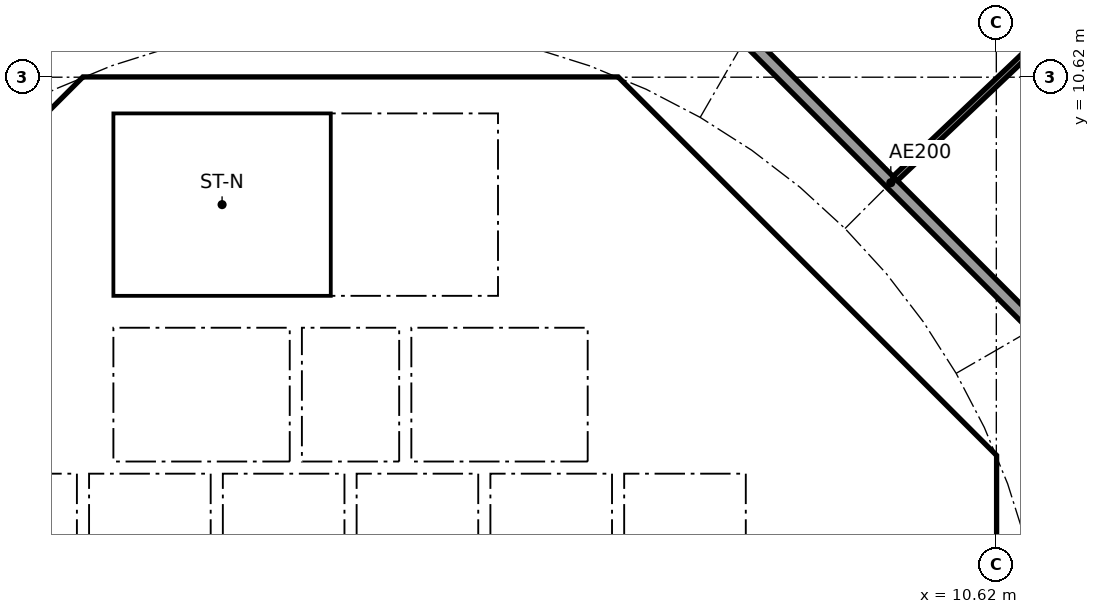
"""IFC4 building model, lengths in metres.
Left out: names, types, materials, properties, quantities, classifications, styles, units other than length and angle.
Written with IfcOpenShell. Run it as: python <this file> out.ifc"""

import sys

from ifc_helpers import new_model, si_unit, direction, frame, frame_2d, origin, place, context, subcontext, project, spatial, polyline, rectangle, outline, extrude, element, fill, save


model = new_model("IFC4")
c1 = context("Model", 3, precision=1e-05, world=origin(), true_north=direction((0.0, 1.0)))
c2 = subcontext(c1, "Body", "Model", "MODEL_VIEW")
j1 = project(units=[si_unit("LENGTHUNIT", "METRE"), si_unit("PLANEANGLEUNIT", "RADIAN")], contexts=[c1])
p1 = place(None, origin())
s1 = spatial("IfcSite", under=j1, at=p1, CompositionType="ELEMENT")
p2 = place(p1, origin())
s2 = spatial("IfcBuilding", under=s1, at=p2, CompositionType="ELEMENT")
p3 = place(p2, frame((0.0, 0.0, 38.1)))
s3 = spatial("IfcBuildingStorey", under=s2, at=p3, CompositionType="ELEMENT", Elevation=38.1)
p4 = place(p3, frame((9.988, 4.613, 0.0), z_axis=(0.0, 0.0, 1.0), x_axis=(-0.707106781187, 0.707106781187, 0.0)))
e1 = element("IfcWall", 1, at=p4, inside=s3, PredefinedType="SHEAR", context=c2, shape_type="SweptSolid", body=[
    extrude(rectangle(XDim=7.602, YDim=0.6, at=frame_2d((3.801, 0.0))), origin(), (0.0, 0.0, 1.0), 3.44),
])
p5 = place(p4, frame((3.201, 0.0, 0.0)))
e2 = element("IfcOpeningElement", 2, at=p5, cuts=e1, PredefinedType="OPENING", context=c2, shape_type="SweptSolid", body=[
    extrude(rectangle(XDim=1.2, YDim=2.1, at=frame_2d((0.6, 1.05))), frame((0.0, 0.31, 0.0), z_axis=(0.0, -1.0, 0.0), x_axis=(1.0, 0.0, 0.0)), (0.0, 0.0, 1.0), 0.62),
])
p6 = place(p3, frame((-4.613, 9.988, 0.0), z_axis=(0.0, 0.0, 1.0), x_axis=(-0.707106781187, -0.707106781187, 0.0)))
e3 = element("IfcWall", 3, at=p6, inside=s3, PredefinedType="SHEAR", context=c2, shape_type="SweptSolid", body=[
    extrude(rectangle(XDim=7.602, YDim=0.6, at=frame_2d((3.801, 0.0))), origin(), (0.0, 0.0, 1.0), 3.44),
])
p7 = place(p6, frame((0.351, 0.0, 0.0)))
e4 = element("IfcOpeningElement", 4, at=p7, cuts=e3, PredefinedType="OPENING", context=c2, shape_type="SweptSolid", body=[
    extrude(rectangle(XDim=1.1, YDim=2.1, at=frame_2d((0.55, 1.05))), frame((0.0, 0.31, 0.0), z_axis=(0.0, -1.0, 0.0), x_axis=(1.0, 0.0, 0.0)), (0.0, 0.0, 1.0), 0.62),
])
p8 = place(p3, frame((4.0, 4.3, 0.0), z_axis=(0.0, 0.0, 1.0), x_axis=(0.0, 1.0, 0.0)))
e5 = element("IfcWall", 5, at=p8, inside=s3, PredefinedType="SOLIDWALL", context=c2, shape_type="SweptSolid", body=[
    extrude(rectangle(XDim=2.2, YDim=0.2, at=frame_2d((1.1, 0.0))), origin(), (0.0, 0.0, 1.0), 3.44),
])
p9 = place(p8, frame((0.55, 0.0, 0.0)))
e6 = element("IfcOpeningElement", 6, at=p9, cuts=e5, PredefinedType="OPENING", context=c2, shape_type="SweptSolid", body=[
    extrude(rectangle(XDim=1.1, YDim=2.1, at=frame_2d((0.55, 1.05))), frame((0.0, 0.11, 0.0), z_axis=(0.0, -1.0, 0.0), x_axis=(1.0, 0.0, 0.0)), (0.0, 0.0, 1.0), 0.22),
])
p10 = place(p3, frame((-4.0, 4.3, 0.0), z_axis=(0.0, 0.0, 1.0), x_axis=(0.0, 1.0, 0.0)))
e7 = element("IfcWall", 7, at=p10, inside=s3, PredefinedType="SOLIDWALL", context=c2, shape_type="SweptSolid", body=[
    extrude(rectangle(XDim=2.2, YDim=0.2, at=frame_2d((1.1, 0.0))), origin(), (0.0, 0.0, 1.0), 3.44),
])
p11 = place(p10, frame((0.55, 0.0, 0.0)))
e8 = element("IfcOpeningElement", 8, at=p11, cuts=e7, PredefinedType="OPENING", context=c2, shape_type="SweptSolid", body=[
    extrude(rectangle(XDim=1.1, YDim=2.1, at=frame_2d((0.55, 1.05))), frame((0.0, 0.11, 0.0), z_axis=(0.0, -1.0, 0.0), x_axis=(1.0, 0.0, 0.0)), (0.0, 0.0, 1.0), 0.22),
])
p12 = place(p3, frame((6.7, 4.0, 0.0), z_axis=(0.0, 0.0, 1.0), x_axis=(1.0, 0.0, 0.0)))
e9 = element("IfcWall", 9, at=p12, inside=s3, PredefinedType="SOLIDWALL", context=c2, shape_type="SweptSolid", body=[
    extrude(rectangle(XDim=3.325, YDim=0.2, at=frame_2d((1.662, 0.0))), origin(), (0.0, 0.0, 1.0), 3.44),
])
p13 = place(p12, frame((1.25, 0.0, 0.0)))
e10 = element("IfcOpeningElement", 10, at=p13, cuts=e9, PredefinedType="OPENING", context=c2, shape_type="SweptSolid", body=[
    extrude(rectangle(XDim=1.1, YDim=2.1, at=frame_2d((0.55, 1.05))), frame((0.0, 0.11, 0.0), z_axis=(0.0, -1.0, 0.0), x_axis=(1.0, 0.0, 0.0)), (0.0, 0.0, 1.0), 0.22),
])
p14 = place(p3, frame((4.0, 7.025, 0.0), z_axis=(0.0, 0.0, 1.0), x_axis=(0.0, 1.0, 0.0)))
e11 = element("IfcWall", 11, at=p14, inside=s3, PredefinedType="SOLIDWALL", context=c2, shape_type="SweptSolid", body=[
    extrude(rectangle(XDim=3.0, YDim=0.2, at=frame_2d((1.5, 0.0))), origin(), (0.0, 0.0, 1.0), 3.44),
])
p15 = place(p14, frame((0.925, 0.0, 0.0)))
e12 = element("IfcOpeningElement", 12, at=p15, cuts=e11, PredefinedType="OPENING", context=c2, shape_type="SweptSolid", body=[
    extrude(rectangle(XDim=1.1, YDim=2.1, at=frame_2d((0.55, 1.05))), frame((0.0, 0.11, 0.0), z_axis=(0.0, -1.0, 0.0), x_axis=(1.0, 0.0, 0.0)), (0.0, 0.0, 1.0), 0.22),
])
p16 = place(p3, origin())
e13 = element("IfcWall", 13, at=p16, inside=s3, PredefinedType="SHEAR", context=c2, shape_type="SweptSolid", body=[
    extrude(outline(polyline([(-4.152, 10.025), (-4.401, 9.776), (-4.825, 10.2), (-4.401, 10.625), (4.401, 10.625), (4.825, 10.2), (4.401, 9.776), (4.152, 10.025), (-4.152, 10.025)])), origin(), (0.0, 0.0, 1.0), 3.44),
])
p17 = place(p3, origin())
e14 = element("IfcWall", 14, at=p17, inside=s3, PredefinedType="SHEAR", context=c2, shape_type="SweptSolid", body=[
    extrude(outline(polyline([(9.776, -4.401), (10.025, -4.152), (10.025, -3.801), (10.025, 4.152), (9.776, 4.401), (10.2, 4.825), (10.625, 4.401), (10.625, -4.401), (10.2, -4.825), (9.776, -4.401)])), origin(), (0.0, 0.0, 1.0), 3.44),
])
for number, where, z_axis, x_axis in (
    (15, (-0.9, 4.3, 0.0), (0.0, 0.0, 1.0), (0.0, 1.0, 0.0)),
    (16, (0.9, 4.3, 0.0), (0.0, 0.0, 1.0), (0.0, 1.0, 0.0)),
):
    element("IfcWall", number, at=place(p3, frame(where, z_axis=z_axis, x_axis=x_axis)), inside=s3, PredefinedType="SOLIDWALL", context=c2, shape_type="SweptSolid", body=[
        extrude(rectangle(XDim=2.2, YDim=0.2, at=frame_2d((1.1, 0.0))), origin(), (0.0, 0.0, 1.0), 3.44),
    ])
p18 = place(p3, origin())
e17 = element("IfcWall", 17, at=p18, inside=s3, PredefinedType="SOLIDWALL", context=c2, shape_type="SweptSolid", body=[
    extrude(outline(polyline([(-6.5, 2.1), (-6.7, 2.1), (-6.7, 4.3), (6.7, 4.3), (6.7, 2.1), (6.5, 2.1), (6.5, 4.1), (4.5, 4.1), (4.5, 2.1), (4.3, 2.1), (4.3, 4.1), (2.3, 4.1), (2.3, 2.1), (2.1, 2.1), (2.1, 4.1), (0.1, 4.1), (0.1, 2.1), (-0.1, 2.1), (-0.1, 4.1), (-2.1, 4.1), (-2.1, 2.1), (-2.3, 2.1), (-2.3, 4.1), (-4.3, 4.1), (-4.3, 2.1), (-4.5, 2.1), (-4.5, 4.1), (-6.5, 4.1), (-6.5, 2.1)])), origin(), (0.0, 0.0, 1.0), 3.44),
])
p19 = place(p3, origin())
e18 = element("IfcWall", 18, at=p19, inside=s3, PredefinedType="SOLIDWALL", context=c2, shape_type="SweptSolid", body=[
    extrude(outline(polyline([(-3.9, 7.025), (-4.1, 7.025), (-4.1, 10.025), (-3.9, 10.025), (-3.9, 7.025)])), origin(), (0.0, 0.0, 1.0), 3.44),
])
p20 = place(p3, origin())
e19 = element("IfcWall", 19, at=p20, inside=s3, PredefinedType="SOLIDWALL", context=c2, shape_type="SweptSolid", body=[
    extrude(outline(polyline([(4.1, 6.5), (-4.1, 6.5), (-4.1, 7.025), (4.1, 7.025), (4.1, 6.5)])), origin(), (0.0, 0.0, 1.0), 3.44),
])
p21 = place(p3, origin())
e20 = element("IfcWall", 20, at=p21, inside=s3, PredefinedType="SOLIDWALL", context=c2, shape_type="SweptSolid", body=[
    extrude(outline(polyline([(7.025, -3.9), (6.7, -3.9), (6.7, 3.9), (7.025, 3.9), (7.025, -3.9)])), origin(), (0.0, 0.0, 1.0), 3.44),
])
p22 = place(p3, frame((12.635, 5.134, 0.0), z_axis=(0.0, 0.0, 1.0), x_axis=(-0.707106781187, 0.707106781187, 0.0)))
e21 = element("IfcWall", 21, at=p22, inside=s3, PredefinedType="PARTITIONING", context=c2, shape_type="SweptSolid", body=[
    extrude(rectangle(XDim=10.609, YDim=0.2, at=frame_2d((5.305, 0.0))), origin(), (0.0, 0.0, 1.0), 3.44),
])
p23 = place(p3, frame((8.957, 8.953, 0.0), z_axis=(0.0, 0.0, 1.0), x_axis=(0.725250022034, 0.688485588476, 0.0)))
e22 = element("IfcWall", 22, at=p23, inside=s3, PredefinedType="PARTITIONING", context=c2, shape_type="SweptSolid", body=[
    extrude(rectangle(XDim=12.963, YDim=0.1, at=frame_2d((6.481, 0.0))), origin(), (0.0, 0.0, 1.0), 2.687),
])
p24 = place(p23, frame((8.79, 0.0, 0.0)))
e23 = element("IfcOpeningElement", 23, at=p24, cuts=e22, PredefinedType="OPENING", context=c2, shape_type="SweptSolid", body=[
    extrude(rectangle(XDim=0.9, YDim=2.1, at=frame_2d((0.45, 1.05))), frame((0.0, 0.06, 0.0), z_axis=(0.0, -1.0, 0.0), x_axis=(1.0, 0.0, 0.0)), (0.0, 0.0, 1.0), 0.12),
])
p25 = place(p9, origin())
e24 = element("IfcDoor", 24, at=p25, inside=s3, OperationType="DOUBLE_DOOR_SLIDING", PredefinedType="DOOR", context=c2, shape_type="SweptSolid", body=[
    extrude(rectangle(XDim=1.1, YDim=2.1, at=frame_2d((0.55, 1.05))), frame((0.0, 0.025, 0.0), z_axis=(0.0, -1.0, 0.0), x_axis=(1.0, 0.0, 0.0)), (0.0, 0.0, 1.0), 0.05),
])
fill(e6, e24)
p26 = place(p11, origin())
e25 = element("IfcDoor", 25, at=p26, inside=s3, OperationType="DOUBLE_DOOR_SLIDING", PredefinedType="DOOR", context=c2, shape_type="SweptSolid", body=[
    extrude(rectangle(XDim=1.1, YDim=2.1, at=frame_2d((0.55, 1.05))), frame((0.0, 0.025, 0.0), z_axis=(0.0, -1.0, 0.0), x_axis=(1.0, 0.0, 0.0)), (0.0, 0.0, 1.0), 0.05),
])
fill(e8, e25)
p27 = place(p13, frame((1.1, 0.0, 0.0), x_axis=(-1.0, 0.0, 0.0)))
e26 = element("IfcDoor", 26, at=p27, inside=s3, OperationType="SINGLE_SWING_LEFT", PredefinedType="DOOR", context=c2, shape_type="SweptSolid", body=[
    extrude(rectangle(XDim=1.1, YDim=2.1, at=frame_2d((0.55, 1.05))), frame((0.0, 0.025, 0.0), z_axis=(0.0, -1.0, 0.0), x_axis=(1.0, 0.0, 0.0)), (0.0, 0.0, 1.0), 0.05),
])
fill(e10, e26)
p28 = place(p15, origin())
e27 = element("IfcDoor", 27, at=p28, inside=s3, OperationType="SINGLE_SWING_RIGHT", PredefinedType="DOOR", context=c2, shape_type="SweptSolid", body=[
    extrude(rectangle(XDim=1.1, YDim=2.1, at=frame_2d((0.55, 1.05))), frame((0.0, 0.025, 0.0), z_axis=(0.0, -1.0, 0.0), x_axis=(1.0, 0.0, 0.0)), (0.0, 0.0, 1.0), 0.05),
])
fill(e12, e27)
p29 = place(p5, origin())
e28 = element("IfcDoor", 28, at=p29, inside=s3, OperationType="SINGLE_SWING_RIGHT", PredefinedType="DOOR", context=c2, shape_type="SweptSolid", body=[
    extrude(rectangle(XDim=1.2, YDim=2.1, at=frame_2d((0.6, 1.05))), frame((0.0, 0.025, 0.0), z_axis=(0.0, -1.0, 0.0), x_axis=(1.0, 0.0, 0.0)), (0.0, 0.0, 1.0), 0.05),
])
fill(e2, e28)
p30 = place(p7, origin())
e29 = element("IfcDoor", 29, at=p30, inside=s3, OperationType="SINGLE_SWING_RIGHT", PredefinedType="DOOR", context=c2, shape_type="SweptSolid", body=[
    extrude(rectangle(XDim=1.1, YDim=2.1, at=frame_2d((0.55, 1.05))), frame((0.0, 0.025, 0.0), z_axis=(0.0, -1.0, 0.0), x_axis=(1.0, 0.0, 0.0)), (0.0, 0.0, 1.0), 0.05),
])
fill(e4, e29)
save(model, sys.argv[1])
